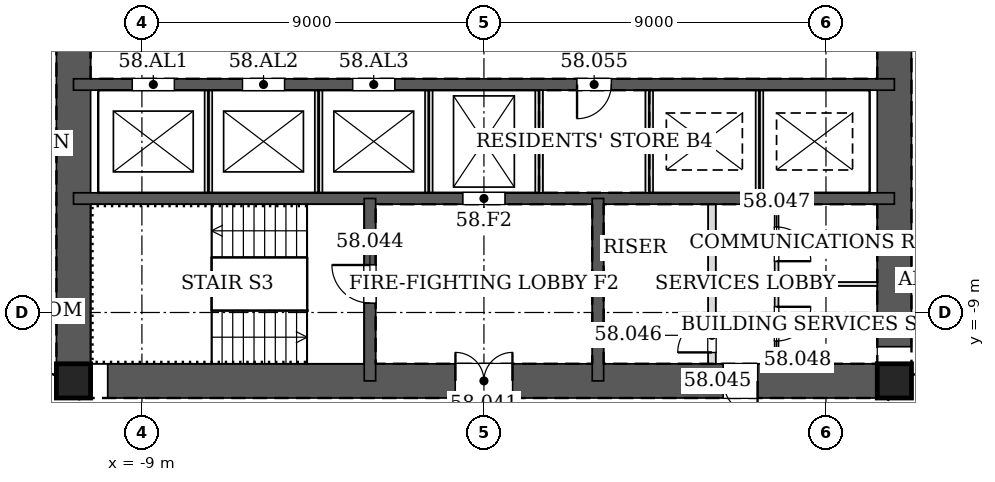
"""IFC4 building model, lengths in metres.
Left out: names, types, materials, properties, quantities, classifications, styles, units other than length and angle.
Written with IfcOpenShell. Run it as: python <this file> out.ifc"""

import sys

from ifc_helpers import new_model, si_unit, direction, frame, frame_2d, origin, origin_2d, place, context, subcontext, project, spatial, rectangle, hollow_rectangle, extrude, element, fill, save


model = new_model("IFC4")
c1 = context("Model", 3, precision=1e-05, world=origin(), true_north=direction((0.0, 1.0)))
c2 = subcontext(c1, "Body", "Model", "MODEL_VIEW")
j1 = project(units=[si_unit("LENGTHUNIT", "METRE"), si_unit("PLANEANGLEUNIT", "RADIAN")], contexts=[c1])
p1 = place(None, origin())
s1 = spatial("IfcSite", under=j1, at=p1, CompositionType="ELEMENT")
p2 = place(p1, origin())
s2 = spatial("IfcBuilding", under=s1, at=p2, CompositionType="ELEMENT")
p3 = place(p2, frame((0.0, 0.0, 244.8)))
s3 = spatial("IfcBuildingStorey", under=s2, at=p3, CompositionType="ELEMENT", Elevation=244.8)
for number, where, z_axis, x_axis in (
    (1, (-10.8, -10.8, 0.0), (0.0, 0.0, 1.0), (1.0, 0.0, 0.0)),
    (2, (10.8, -10.8, 0.0), (0.0, 0.0, 1.0), (1.0, 0.0, 0.0)),
):
    element("IfcColumn", number, at=place(p3, frame(where, z_axis=z_axis, x_axis=x_axis)), inside=s3, PredefinedType="COLUMN", context=c2, shape_type="SweptSolid", body=[
        extrude(hollow_rectangle(XDim=0.9, YDim=0.9, WallThickness=0.04, at=origin_2d()), origin(), (0.0, 0.0, 1.0), 3.4),
    ])
p4 = place(p3, frame((-10.8, -10.8, 0.0), z_axis=(0.0, 0.0, 1.0), x_axis=(1.0, 0.0, 0.0)))
e3 = element("IfcWall", 3, at=p4, inside=s3, PredefinedType="SOLIDWALL", context=c2, shape_type="SweptSolid", body=[
    extrude(rectangle(XDim=21.6, YDim=0.9, at=frame_2d((10.8, 0.0))), origin(), (0.0, 0.0, 1.0), 3.4),
])
p5 = place(p4, frame((10.05, 0.0, 0.0)))
e4 = element("IfcOpeningElement", 4, at=p5, cuts=e3, PredefinedType="OPENING", context=c2, shape_type="SweptSolid", body=[
    extrude(rectangle(XDim=1.5, YDim=2.1, at=frame_2d((0.75, 1.05))), frame((0.0, 0.46, 0.0), z_axis=(0.0, -1.0, 0.0), x_axis=(1.0, 0.0, 0.0)), (0.0, 0.0, 1.0), 0.92),
])
p6 = place(p4, frame((17.1, 0.0, 0.0)))
e5 = element("IfcOpeningElement", 5, at=p6, cuts=e3, PredefinedType="OPENING", context=c2, shape_type="SweptSolid", body=[
    extrude(rectangle(XDim=0.9, YDim=2.1, at=frame_2d((0.45, 1.05))), frame((0.0, 0.46, 0.0), z_axis=(0.0, -1.0, 0.0), x_axis=(1.0, 0.0, 0.0)), (0.0, 0.0, 1.0), 0.92),
])
p7 = place(p3, frame((10.8, -10.8, 0.0), z_axis=(0.0, 0.0, 1.0), x_axis=(0.0, 1.0, 0.0)))
e6 = element("IfcWall", 6, at=p7, inside=s3, PredefinedType="SOLIDWALL", context=c2, shape_type="SweptSolid", body=[
    extrude(rectangle(XDim=21.6, YDim=0.9, at=frame_2d((10.8, 0.0))), origin(), (0.0, 0.0, 1.0), 3.4),
])
p8 = place(p7, frame((11.7, 0.0, 0.0)))
e7 = element("IfcOpeningElement", 7, at=p8, cuts=e6, PredefinedType="OPENING", context=c2, shape_type="SweptSolid", body=[
    extrude(rectangle(XDim=1.2, YDim=2.1, at=frame_2d((0.6, 1.05))), frame((0.0, 0.46, 0.0), z_axis=(0.0, -1.0, 0.0), x_axis=(1.0, 0.0, 0.0)), (0.0, 0.0, 1.0), 0.92),
])
p9 = place(p7, frame((8.7, 0.0, 0.0)))
e8 = element("IfcOpeningElement", 8, at=p9, cuts=e6, PredefinedType="OPENING", context=c2, shape_type="SweptSolid", body=[
    extrude(rectangle(XDim=1.2, YDim=2.1, at=frame_2d((0.6, 1.05))), frame((0.0, 0.46, 0.0), z_axis=(0.0, -1.0, 0.0), x_axis=(1.0, 0.0, 0.0)), (0.0, 0.0, 1.0), 0.92),
])
p10 = place(p3, frame((-10.8, 10.8, 0.0), z_axis=(0.0, 0.0, 1.0), x_axis=(0.0, -1.0, 0.0)))
e9 = element("IfcWall", 9, at=p10, inside=s3, PredefinedType="SOLIDWALL", context=c2, shape_type="SweptSolid", body=[
    extrude(rectangle(XDim=21.6, YDim=0.9, at=frame_2d((10.8, 0.0))), origin(), (0.0, 0.0, 1.0), 3.4),
])
p11 = place(p10, frame((8.7, 0.0, 0.0)))
e10 = element("IfcOpeningElement", 10, at=p11, cuts=e9, PredefinedType="OPENING", context=c2, shape_type="SweptSolid", body=[
    extrude(rectangle(XDim=1.2, YDim=2.1, at=frame_2d((0.6, 1.05))), frame((0.0, 0.46, 0.0), z_axis=(0.0, -1.0, 0.0), x_axis=(1.0, 0.0, 0.0)), (0.0, 0.0, 1.0), 0.92),
])
p12 = place(p10, frame((11.7, 0.0, 0.0)))
e11 = element("IfcOpeningElement", 11, at=p12, cuts=e9, PredefinedType="OPENING", context=c2, shape_type="SweptSolid", body=[
    extrude(rectangle(XDim=1.2, YDim=2.1, at=frame_2d((0.6, 1.05))), frame((0.0, 0.46, 0.0), z_axis=(0.0, -1.0, 0.0), x_axis=(1.0, 0.0, 0.0)), (0.0, 0.0, 1.0), 0.92),
])
p13 = place(p3, frame((-10.8, -3.0, 0.0), z_axis=(0.0, 0.0, 1.0), x_axis=(1.0, 0.0, 0.0)))
e12 = element("IfcWall", 12, at=p13, inside=s3, PredefinedType="SOLIDWALL", context=c2, shape_type="SweptSolid", body=[
    extrude(rectangle(XDim=21.6, YDim=0.3, at=frame_2d((10.8, 0.0))), origin(), (0.0, 0.0, 1.0), 3.4),
])
p14 = place(p13, frame((13.25, 0.0, 0.0)))
e13 = element("IfcOpeningElement", 13, at=p14, cuts=e12, PredefinedType="OPENING", context=c2, shape_type="SweptSolid", body=[
    extrude(rectangle(XDim=0.9, YDim=2.1, at=frame_2d((0.45, 1.05))), frame((0.0, 0.16, 0.0), z_axis=(0.0, -1.0, 0.0), x_axis=(1.0, 0.0, 0.0)), (0.0, 0.0, 1.0), 0.32),
])
p15 = place(p13, frame((1.55, 0.0, 0.0)))
e14 = element("IfcOpeningElement", 14, at=p15, cuts=e12, PredefinedType="OPENING", context=c2, shape_type="SweptSolid", body=[
    extrude(rectangle(XDim=1.1, YDim=2.1, at=frame_2d((0.55, 1.05))), frame((0.0, 0.16, 0.0), z_axis=(0.0, -1.0, 0.0), x_axis=(1.0, 0.0, 0.0)), (0.0, 0.0, 1.0), 0.32),
])
p16 = place(p13, frame((4.45, 0.0, 0.0)))
e15 = element("IfcOpeningElement", 15, at=p16, cuts=e12, PredefinedType="OPENING", context=c2, shape_type="SweptSolid", body=[
    extrude(rectangle(XDim=1.1, YDim=2.1, at=frame_2d((0.55, 1.05))), frame((0.0, 0.16, 0.0), z_axis=(0.0, -1.0, 0.0), x_axis=(1.0, 0.0, 0.0)), (0.0, 0.0, 1.0), 0.32),
])
p17 = place(p13, frame((7.35, 0.0, 0.0)))
e16 = element("IfcOpeningElement", 16, at=p17, cuts=e12, PredefinedType="OPENING", context=c2, shape_type="SweptSolid", body=[
    extrude(rectangle(XDim=1.1, YDim=2.1, at=frame_2d((0.55, 1.05))), frame((0.0, 0.16, 0.0), z_axis=(0.0, -1.0, 0.0), x_axis=(1.0, 0.0, 0.0)), (0.0, 0.0, 1.0), 0.32),
])
p18 = place(p3, frame((-10.8, -6.0, 0.0), z_axis=(0.0, 0.0, 1.0), x_axis=(1.0, 0.0, 0.0)))
e17 = element("IfcWall", 17, at=p18, inside=s3, PredefinedType="SOLIDWALL", context=c2, shape_type="SweptSolid", body=[
    extrude(rectangle(XDim=21.6, YDim=0.3, at=frame_2d((10.8, 0.0))), origin(), (0.0, 0.0, 1.0), 3.4),
])
p19 = place(p18, frame((10.25, 0.0, 0.0)))
e18 = element("IfcOpeningElement", 18, at=p19, cuts=e17, PredefinedType="OPENING", context=c2, shape_type="SweptSolid", body=[
    extrude(rectangle(XDim=1.1, YDim=2.1, at=frame_2d((0.55, 1.05))), frame((0.0, 0.16, 0.0), z_axis=(0.0, -1.0, 0.0), x_axis=(1.0, 0.0, 0.0)), (0.0, 0.0, 1.0), 0.32),
])
p20 = place(p3, frame((-3.0, -6.0, 0.0), z_axis=(0.0, 0.0, 1.0), x_axis=(0.0, -1.0, 0.0)))
e19 = element("IfcWall", 19, at=p20, inside=s3, PredefinedType="SOLIDWALL", context=c2, shape_type="SweptSolid", body=[
    extrude(rectangle(XDim=4.8, YDim=0.3, at=frame_2d((2.4, 0.0))), origin(), (0.0, 0.0, 1.0), 3.4),
])
p21 = place(p20, frame((1.75, 0.0, 0.0)))
e20 = element("IfcOpeningElement", 20, at=p21, cuts=e19, PredefinedType="OPENING", context=c2, shape_type="SweptSolid", body=[
    extrude(rectangle(XDim=1.0, YDim=2.1, at=frame_2d((0.5, 1.05))), frame((0.0, 0.16, 0.0), z_axis=(0.0, -1.0, 0.0), x_axis=(1.0, 0.0, 0.0)), (0.0, 0.0, 1.0), 0.32),
])
p22 = place(p3, frame((3.0, -6.0, 0.0), z_axis=(0.0, 0.0, 1.0), x_axis=(0.0, -1.0, 0.0)))
e21 = element("IfcWall", 21, at=p22, inside=s3, PredefinedType="SOLIDWALL", context=c2, shape_type="SweptSolid", body=[
    extrude(rectangle(XDim=4.8, YDim=0.3, at=frame_2d((2.4, 0.0))), origin(), (0.0, 0.0, 1.0), 3.4),
])
for number, where, z_axis, x_axis in (
    (22, (-7.25, -5.85, 0.0), (0.0, 0.0, 1.0), (0.0, 1.0, 0.0)),
    (23, (-4.35, -5.85, 0.0), (0.0, 0.0, 1.0), (0.0, 1.0, 0.0)),
    (24, (-1.45, -5.85, 0.0), (0.0, 0.0, 1.0), (0.0, 1.0, 0.0)),
):
    element("IfcWall", number, at=place(p3, frame(where, z_axis=z_axis, x_axis=x_axis)), inside=s3, PredefinedType="PARTITIONING", context=c2, shape_type="SweptSolid", body=[
        extrude(rectangle(XDim=2.7, YDim=0.2, at=frame_2d((1.35, 0.0))), origin(), (0.0, 0.0, 1.0), 3.4),
    ])
for number, where, z_axis, x_axis in (
    (25, (1.45, -5.85, 0.0), (0.0, 0.0, 1.0), (0.0, 1.0, 0.0)),
    (26, (4.35, -5.85, 0.0), (0.0, 0.0, 1.0), (0.0, 1.0, 0.0)),
):
    element("IfcWall", number, at=place(p3, frame(where, z_axis=z_axis, x_axis=x_axis)), inside=s3, PredefinedType="PARTITIONING", context=c2, shape_type="SweptSolid", body=[
        extrude(rectangle(XDim=2.7, YDim=0.2, at=frame_2d((1.35, 0.0))), origin(), (0.0, 0.0, 1.0), 3.2),
    ])
p23 = place(p3, frame((7.25, -5.85, 0.0), z_axis=(0.0, 0.0, 1.0), x_axis=(0.0, 1.0, 0.0)))
e27 = element("IfcWall", 27, at=p23, inside=s3, PredefinedType="PARTITIONING", context=c2, shape_type="SweptSolid", body=[
    extrude(rectangle(XDim=2.7, YDim=0.2, at=frame_2d((1.35, 0.0))), origin(), (0.0, 0.0, 1.0), 3.4),
])
p24 = place(p3, frame((6.0, -10.35, 0.0), z_axis=(0.0, 0.0, 1.0), x_axis=(0.0, 1.0, 0.0)))
e28 = element("IfcWall", 28, at=p24, inside=s3, PredefinedType="PARTITIONING", context=c2, shape_type="SweptSolid", body=[
    extrude(rectangle(XDim=4.2, YDim=0.2, at=frame_2d((2.1, 0.0))), origin(), (0.0, 0.0, 1.0), 3.2),
])
p25 = place(p24, frame((0.3, 0.0, 0.0)))
e29 = element("IfcOpeningElement", 29, at=p25, cuts=e28, PredefinedType="OPENING", context=c2, shape_type="SweptSolid", body=[
    extrude(rectangle(XDim=0.9, YDim=2.1, at=frame_2d((0.45, 1.05))), frame((0.0, 0.11, 0.0), z_axis=(0.0, -1.0, 0.0), x_axis=(1.0, 0.0, 0.0)), (0.0, 0.0, 1.0), 0.22),
])
p26 = place(p3, frame((7.7, -10.35, 0.0), z_axis=(0.0, 0.0, 1.0), x_axis=(0.0, 1.0, 0.0)))
e30 = element("IfcWall", 30, at=p26, inside=s3, PredefinedType="PARTITIONING", context=c2, shape_type="SweptSolid", body=[
    extrude(rectangle(XDim=4.2, YDim=0.1, at=frame_2d((2.1, 0.0))), origin(), (0.0, 0.0, 1.0), 3.2),
])
p27 = place(p26, frame((2.7, 0.0, 0.0)))
e31 = element("IfcOpeningElement", 31, at=p27, cuts=e30, PredefinedType="OPENING", context=c2, shape_type="SweptSolid", body=[
    extrude(rectangle(XDim=0.9, YDim=2.1, at=frame_2d((0.45, 1.05))), frame((0.0, 0.06, 0.0), z_axis=(0.0, -1.0, 0.0), x_axis=(1.0, 0.0, 0.0)), (0.0, 0.0, 1.0), 0.12),
])
p28 = place(p26, frame((0.6, 0.0, 0.0)))
e32 = element("IfcOpeningElement", 32, at=p28, cuts=e30, PredefinedType="OPENING", context=c2, shape_type="SweptSolid", body=[
    extrude(rectangle(XDim=0.9, YDim=2.1, at=frame_2d((0.45, 1.05))), frame((0.0, 0.06, 0.0), z_axis=(0.0, -1.0, 0.0), x_axis=(1.0, 0.0, 0.0)), (0.0, 0.0, 1.0), 0.12),
])
p29 = place(p3, frame((7.7, -8.25, 0.0), z_axis=(0.0, 0.0, 1.0), x_axis=(1.0, 0.0, 0.0)))
e33 = element("IfcWall", 33, at=p29, inside=s3, PredefinedType="PARTITIONING", context=c2, shape_type="SweptSolid", body=[
    extrude(rectangle(XDim=2.65, YDim=0.1, at=frame_2d((1.325, 0.0))), origin(), (0.0, 0.0, 1.0), 3.2),
])
p30 = place(p5, origin())
e34 = element("IfcDoor", 34, at=p30, inside=s3, OperationType="DOUBLE_DOOR_SINGLE_SWING", PredefinedType="DOOR", context=c2, shape_type="SweptSolid", body=[
    extrude(rectangle(XDim=1.5, YDim=2.1, at=frame_2d((0.75, 1.05))), frame((0.0, 0.025, 0.0), z_axis=(0.0, -1.0, 0.0), x_axis=(1.0, 0.0, 0.0)), (0.0, 0.0, 1.0), 0.05),
])
fill(e4, e34)
p31 = place(p21, frame((1.0, 0.0, 0.0), z_axis=(0.0, 0.0, 1.0), x_axis=(-1.0, 0.0, 0.0)))
e35 = element("IfcDoor", 35, at=p31, inside=s3, OperationType="SINGLE_SWING_RIGHT", PredefinedType="DOOR", context=c2, shape_type="SweptSolid", body=[
    extrude(rectangle(XDim=1.0, YDim=2.1, at=frame_2d((0.5, 1.05))), frame((0.0, 0.025, 0.0), z_axis=(0.0, -1.0, 0.0), x_axis=(1.0, 0.0, 0.0)), (0.0, 0.0, 1.0), 0.05),
])
fill(e20, e35)
p32 = place(p6, frame((0.9, 0.0, 0.0), z_axis=(0.0, 0.0, 1.0), x_axis=(-1.0, 0.0, 0.0)))
e36 = element("IfcDoor", 36, at=p32, inside=s3, OperationType="SINGLE_SWING_LEFT", PredefinedType="DOOR", context=c2, shape_type="SweptSolid", body=[
    extrude(rectangle(XDim=0.9, YDim=2.1, at=frame_2d((0.45, 1.05))), frame((0.0, 0.025, 0.0), z_axis=(0.0, -1.0, 0.0), x_axis=(1.0, 0.0, 0.0)), (0.0, 0.0, 1.0), 0.05),
])
fill(e5, e36)
p33 = place(p25, origin())
e37 = element("IfcDoor", 37, at=p33, inside=s3, OperationType="SINGLE_SWING_LEFT", PredefinedType="DOOR", context=c2, shape_type="SweptSolid", body=[
    extrude(rectangle(XDim=0.9, YDim=2.1, at=frame_2d((0.45, 1.05))), frame((0.0, 0.025, 0.0), z_axis=(0.0, -1.0, 0.0), x_axis=(1.0, 0.0, 0.0)), (0.0, 0.0, 1.0), 0.05),
])
fill(e29, e37)
p34 = place(p27, frame((0.9, 0.0, 0.0), z_axis=(0.0, 0.0, 1.0), x_axis=(-1.0, 0.0, 0.0)))
e38 = element("IfcDoor", 38, at=p34, inside=s3, OperationType="SINGLE_SWING_RIGHT", PredefinedType="DOOR", context=c2, shape_type="SweptSolid", body=[
    extrude(rectangle(XDim=0.9, YDim=2.1, at=frame_2d((0.45, 1.05))), frame((0.0, 0.025, 0.0), z_axis=(0.0, -1.0, 0.0), x_axis=(1.0, 0.0, 0.0)), (0.0, 0.0, 1.0), 0.05),
])
fill(e31, e38)
p35 = place(p28, frame((0.9, 0.0, 0.0), z_axis=(0.0, 0.0, 1.0), x_axis=(-1.0, 0.0, 0.0)))
e39 = element("IfcDoor", 39, at=p35, inside=s3, OperationType="SINGLE_SWING_LEFT", PredefinedType="DOOR", context=c2, shape_type="SweptSolid", body=[
    extrude(rectangle(XDim=0.9, YDim=2.1, at=frame_2d((0.45, 1.05))), frame((0.0, 0.025, 0.0), z_axis=(0.0, -1.0, 0.0), x_axis=(1.0, 0.0, 0.0)), (0.0, 0.0, 1.0), 0.05),
])
fill(e32, e39)
p36 = place(p14, frame((0.9, 0.0, 0.0), z_axis=(0.0, 0.0, 1.0), x_axis=(-1.0, 0.0, 0.0)))
e40 = element("IfcDoor", 40, at=p36, inside=s3, OperationType="SINGLE_SWING_RIGHT", PredefinedType="DOOR", context=c2, shape_type="SweptSolid", body=[
    extrude(rectangle(XDim=0.9, YDim=2.1, at=frame_2d((0.45, 1.05))), frame((0.0, 0.025, 0.0), z_axis=(0.0, -1.0, 0.0), x_axis=(1.0, 0.0, 0.0)), (0.0, 0.0, 1.0), 0.05),
])
fill(e13, e40)
p37 = place(p19, origin())
e41 = element("IfcDoor", 41, at=p37, inside=s3, OperationType="DOUBLE_DOOR_SLIDING", PredefinedType="DOOR", context=c2, shape_type="SweptSolid", body=[
    extrude(rectangle(XDim=1.1, YDim=2.1, at=frame_2d((0.55, 1.05))), frame((0.0, 0.025, 0.0), z_axis=(0.0, -1.0, 0.0), x_axis=(1.0, 0.0, 0.0)), (0.0, 0.0, 1.0), 0.05),
])
fill(e18, e41)
p38 = place(p15, origin())
e42 = element("IfcDoor", 42, at=p38, inside=s3, OperationType="DOUBLE_DOOR_SLIDING", PredefinedType="DOOR", context=c2, shape_type="SweptSolid", body=[
    extrude(rectangle(XDim=1.1, YDim=2.1, at=frame_2d((0.55, 1.05))), frame((0.0, 0.025, 0.0), z_axis=(0.0, -1.0, 0.0), x_axis=(1.0, 0.0, 0.0)), (0.0, 0.0, 1.0), 0.05),
])
fill(e14, e42)
p39 = place(p16, origin())
e43 = element("IfcDoor", 43, at=p39, inside=s3, OperationType="DOUBLE_DOOR_SLIDING", PredefinedType="DOOR", context=c2, shape_type="SweptSolid", body=[
    extrude(rectangle(XDim=1.1, YDim=2.1, at=frame_2d((0.55, 1.05))), frame((0.0, 0.025, 0.0), z_axis=(0.0, -1.0, 0.0), x_axis=(1.0, 0.0, 0.0)), (0.0, 0.0, 1.0), 0.05),
])
fill(e15, e43)
p40 = place(p17, origin())
e44 = element("IfcDoor", 44, at=p40, inside=s3, OperationType="DOUBLE_DOOR_SLIDING", PredefinedType="DOOR", context=c2, shape_type="SweptSolid", body=[
    extrude(rectangle(XDim=1.1, YDim=2.1, at=frame_2d((0.55, 1.05))), frame((0.0, 0.025, 0.0), z_axis=(0.0, -1.0, 0.0), x_axis=(1.0, 0.0, 0.0)), (0.0, 0.0, 1.0), 0.05),
])
fill(e16, e44)
save(model, sys.argv[1])
